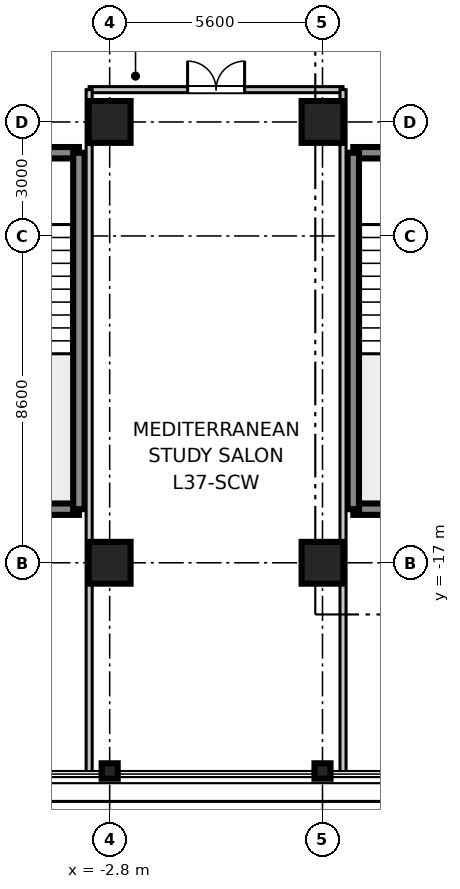
"""IFC4 building model, lengths in metres.
Left out: names, types, materials, properties, quantities, classifications, styles, units other than length and angle.
Written with IfcOpenShell. Run it as: python <this file> out.ifc"""

import sys

from ifc_helpers import new_model, si_unit, direction, frame, frame_2d, origin, origin_2d, place, context, subcontext, project, spatial, rectangle, i_section, extrude, source, transform, mapped, element, fill, save


model = new_model("IFC4")
c1 = context("Model", 3, precision=1e-05, world=origin(), true_north=direction((0.0, 1.0)))
c2 = subcontext(c1, "Body", "Model", "MODEL_VIEW")
j1 = project(units=[si_unit("LENGTHUNIT", "METRE"), si_unit("PLANEANGLEUNIT", "RADIAN")], contexts=[c1])
p1 = place(None, origin())
s1 = spatial("IfcSite", under=j1, at=p1, CompositionType="ELEMENT")
p2 = place(p1, origin())
s2 = spatial("IfcBuilding", under=s1, at=p2, CompositionType="ELEMENT")
p3 = place(p2, frame((0.0, 0.0, 149.0)))
s3 = spatial("IfcBuildingStorey", under=s2, at=p3, CompositionType="ELEMENT", Elevation=149.0)
m1 = source(origin(), c2, "Body", "SweptSolid", [
    extrude(rectangle(XDim=1.1, YDim=1.1, at=origin_2d()), origin(), (0.0, 0.0, 1.0), 3.605),
])
for number, where, z_axis, x_axis in (
    (1, (-2.8, -17.0, 0.0), (0.0, 0.0, 1.0), (1.0, 0.0, 0.0)),
    (2, (-2.8, -5.4, 0.0), (0.0, 0.0, 1.0), (1.0, 0.0, 0.0)),
    (3, (2.8, -17.0, 0.0), (0.0, 0.0, 1.0), (1.0, 0.0, 0.0)),
    (4, (2.8, -5.4, 0.0), (0.0, 0.0, 1.0), (1.0, 0.0, 0.0)),
):
    element("IfcColumn", number, at=place(p3, frame(where, z_axis=z_axis, x_axis=x_axis)), inside=s3, PredefinedType="COLUMN", context=c2, shape_type="MappedRepresentation", body=[
        mapped(m1, transform((0.0, 0.0, 0.0), scale=1.0)),
    ])
m2 = source(origin(), c2, "Body", "SweptSolid", [
    extrude(i_section(OverallWidth=0.406, OverallDepth=0.422, WebThickness=0.019, FlangeThickness=0.03, at=origin_2d()), origin(), (0.0, 0.0, 1.0), 3.605),
])
for number, where, z_axis, x_axis in (
    (5, (-2.8, -22.48, 0.0), (0.0, 0.0, 1.0), (0.0, 1.0, 0.0)),
    (6, (2.8, -22.48, 0.0), (0.0, 0.0, 1.0), (0.0, 1.0, 0.0)),
):
    element("IfcColumn", number, at=place(p3, frame(where, z_axis=z_axis, x_axis=x_axis)), inside=s3, PredefinedType="COLUMN", context=c2, shape_type="MappedRepresentation", body=[
        mapped(m2, transform((0.0, 0.0, 0.0), scale=1.0)),
    ])
m3 = source(origin(), c2, "Body", "SweptSolid", [
    extrude(rectangle(XDim=3.98, YDim=0.3, at=frame_2d((1.99, 0.0))), origin(), (0.0, 0.0, 1.0), 3.39),
])
for number, where, z_axis, x_axis in (
    (7, (3.61, -15.59, 0.0), (0.0, 0.0, 1.0), (1.0, 0.0, 0.0)),
    (8, (3.61, -6.21, 0.0), (0.0, 0.0, 1.0), (1.0, 0.0, 0.0)),
):
    element("IfcWall", number, at=place(p3, frame(where, z_axis=z_axis, x_axis=x_axis)), inside=s3, PredefinedType="SHEAR", context=c2, shape_type="MappedRepresentation", body=[
        mapped(m3, transform((0.0, 0.0, 0.0), scale=1.0)),
    ])
m4 = source(origin(), c2, "Body", "SweptSolid", [
    extrude(rectangle(XDim=9.38, YDim=0.3, at=frame_2d((4.69, 0.0))), origin(), (0.0, 0.0, 1.0), 3.39),
])
p4 = place(p3, frame((3.61, -15.59, 0.0), z_axis=(0.0, 0.0, 1.0), x_axis=(0.0, 1.0, 0.0)))
e9 = element("IfcWall", 9, at=p4, inside=s3, PredefinedType="SHEAR", context=c2, shape_type="MappedRepresentation", body=[
    mapped(m4, transform((0.0, 0.0, 0.0), scale=1.0)),
])
p5 = place(p3, frame((-7.59, -15.59, 0.0), z_axis=(0.0, 0.0, 1.0), x_axis=(1.0, 0.0, 0.0)))
e10 = element("IfcWall", 10, at=p5, inside=s3, PredefinedType="SHEAR", context=c2, shape_type="MappedRepresentation", body=[
    mapped(m3, transform((0.0, 0.0, 0.0), scale=1.0)),
])
p6 = place(p3, frame((-7.59, -6.21, 0.0), z_axis=(0.0, 0.0, 1.0), x_axis=(1.0, 0.0, 0.0)))
e11 = element("IfcWall", 11, at=p6, inside=s3, PredefinedType="SHEAR", context=c2, shape_type="MappedRepresentation", body=[
    mapped(m3, transform((0.0, 0.0, 0.0), scale=1.0)),
])
p7 = place(p6, frame((1.44, 0.0, 0.0)))
e12 = element("IfcOpeningElement", 12, at=p7, cuts=e11, PredefinedType="OPENING", context=c2, shape_type="SweptSolid", body=[
    extrude(rectangle(XDim=1.1, YDim=2.15, at=frame_2d((0.55, 1.075))), frame((0.0, 0.16, 0.0), z_axis=(0.0, -1.0, 0.0), x_axis=(1.0, 0.0, 0.0)), (0.0, 0.0, 1.0), 0.32),
])
p8 = place(p3, frame((-3.61, -15.59, 0.0), z_axis=(0.0, 0.0, 1.0), x_axis=(0.0, 1.0, 0.0)))
e13 = element("IfcWall", 13, at=p8, inside=s3, PredefinedType="SHEAR", context=c2, shape_type="MappedRepresentation", body=[
    mapped(m4, transform((0.0, 0.0, 0.0), scale=1.0)),
])
m5 = source(origin(), c2, "Body", "SweptSolid", [
    extrude(rectangle(XDim=6.68, YDim=0.16, at=frame_2d((3.34, 0.0))), origin(), (0.0, 0.0, 1.0), 2.73),
])
p9 = place(p3, frame((-3.34, -4.55, 0.0), z_axis=(0.0, 0.0, 1.0), x_axis=(1.0, 0.0, 0.0)))
e14 = element("IfcWall", 14, at=p9, inside=s3, PredefinedType="PARTITIONING", context=c2, shape_type="MappedRepresentation", body=[
    mapped(m5, transform((0.0, 0.0, 0.0), scale=1.0)),
])
p10 = place(p9, frame((2.59, 0.0, 0.0)))
e15 = element("IfcOpeningElement", 15, at=p10, cuts=e14, PredefinedType="OPENING", context=c2, shape_type="SweptSolid", body=[
    extrude(rectangle(XDim=1.5, YDim=2.15, at=frame_2d((0.75, 1.075))), frame((0.0, 0.09, 0.0), z_axis=(0.0, -1.0, 0.0), x_axis=(1.0, 0.0, 0.0)), (0.0, 0.0, 1.0), 0.18),
])
m6 = source(origin(), c2, "Body", "SweptSolid", [
    extrude(rectangle(XDim=17.95, YDim=0.16, at=frame_2d((8.975, 0.0))), origin(), (0.0, 0.0, 1.0), 2.73),
])
for number, where, z_axis, x_axis in (
    (16, (-3.34, -22.5, 0.0), (0.0, 0.0, 1.0), (0.0, 1.0, 0.0)),
    (17, (3.34, -22.5, 0.0), (0.0, 0.0, 1.0), (0.0, 1.0, 0.0)),
):
    element("IfcWall", number, at=place(p3, frame(where, z_axis=z_axis, x_axis=x_axis)), inside=s3, PredefinedType="PARTITIONING", context=c2, shape_type="MappedRepresentation", body=[
        mapped(m6, transform((0.0, 0.0, 0.0), scale=1.0)),
    ])
m7 = source(origin(), c2, "Body", "SweptSolid", [
    extrude(rectangle(XDim=1.5, YDim=2.15, at=frame_2d((0.75, 1.075))), frame((0.0, 0.025, 0.0), z_axis=(0.0, -1.0, 0.0), x_axis=(1.0, 0.0, 0.0)), (0.0, 0.0, 1.0), 0.05),
])
p11 = place(p10, frame((1.5, 0.0, 0.0), z_axis=(0.0, 0.0, 1.0), x_axis=(-1.0, 0.0, 0.0)))
e18 = element("IfcDoor", 18, at=p11, inside=s3, OperationType="DOUBLE_DOOR_SINGLE_SWING", PredefinedType="DOOR", context=c2, shape_type="MappedRepresentation", body=[
    mapped(m7, transform((0.0, 0.0, 0.0), scale=1.0)),
])
fill(e15, e18)
save(model, sys.argv[1])
